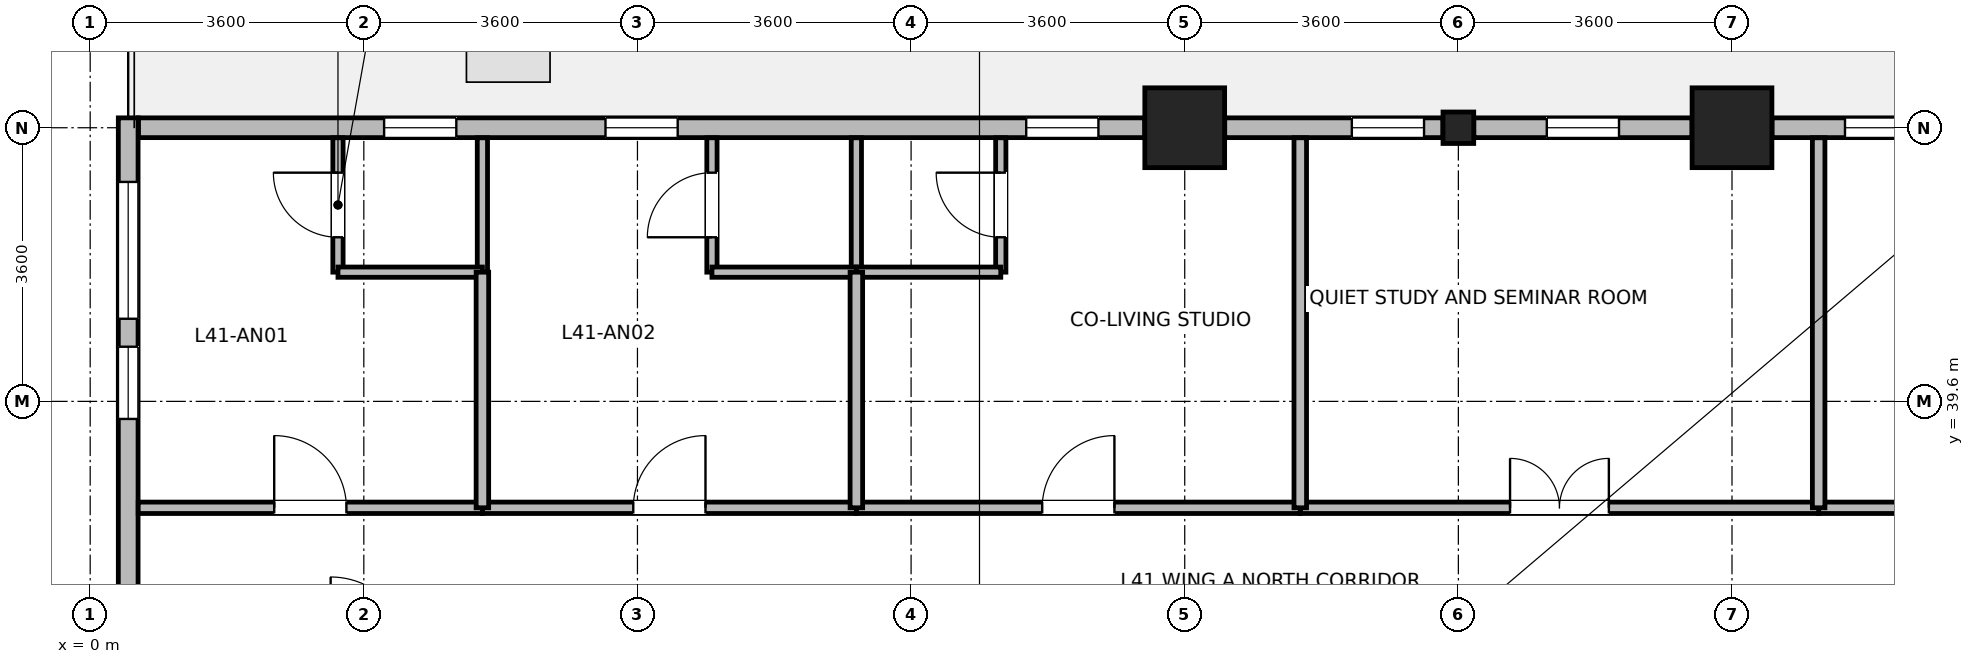
"""IFC4 building model, lengths in metres.
Left out: names, types, materials, properties, quantities, classifications, styles, units other than length and angle.
Written with IfcOpenShell. Run it as: python <this file> out.ifc"""

import sys

from ifc_helpers import new_model, si_unit, direction, frame, frame_2d, origin, origin_2d, place, context, subcontext, project, spatial, rectangle, i_section, extrude, source, transform, mapped, element, fill, save


model = new_model("IFC4")
c1 = context("Model", 3, precision=1e-05, world=origin(), true_north=direction((0.0, 1.0)))
c2 = subcontext(c1, "Body", "Model", "MODEL_VIEW")
j1 = project(units=[si_unit("LENGTHUNIT", "METRE"), si_unit("PLANEANGLEUNIT", "RADIAN")], contexts=[c1])
p1 = place(None, origin())
s1 = spatial("IfcSite", under=j1, at=p1, CompositionType="ELEMENT")
p2 = place(p1, origin())
s2 = spatial("IfcBuilding", under=s1, at=p2, CompositionType="ELEMENT")
p3 = place(p2, frame((0.0, 0.0, 162.4)))
s3 = spatial("IfcBuildingStorey", under=s2, at=p3, CompositionType="ELEMENT", Elevation=162.4)
m1 = source(origin(), c2, "Body", "SweptSolid", [
    extrude(rectangle(XDim=1.05, YDim=1.05, at=origin_2d()), origin(), (0.0, 0.0, 1.0), 3.7),
])
for number, where, z_axis, x_axis in (
    (1, (14.4, 43.2, 0.0), (0.0, 0.0, 1.0), (1.0, 0.0, 0.0)),
    (2, (21.6, 43.2, 0.0), (0.0, 0.0, 1.0), (1.0, 0.0, 0.0)),
):
    element("IfcColumn", number, at=place(p3, frame(where, z_axis=z_axis, x_axis=x_axis)), inside=s3, PredefinedType="COLUMN", context=c2, shape_type="MappedRepresentation", body=[
        mapped(m1, transform((0.0, 0.0, 0.0), x_axis=(1.0, 0.0, 0.0), y_axis=(0.0, 1.0, 0.0), z_axis=(0.0, 0.0, 1.0), scale=1.0)),
    ])
m2 = source(origin(), c2, "Body", "SweptSolid", [
    extrude(i_section(OverallWidth=0.404, OverallDepth=0.414, WebThickness=0.021, FlangeThickness=0.028, FilletRadius=0.015, at=origin_2d()), origin(), (0.0, 0.0, 1.0), 3.7),
])
p4 = place(p3, frame((18.0, 43.2, 0.0), z_axis=(0.0, 0.0, 1.0), x_axis=(1.0, 0.0, 0.0)))
e3 = element("IfcColumn", 3, at=p4, inside=s3, PredefinedType="COLUMN", context=c2, shape_type="MappedRepresentation", body=[
    mapped(m2, transform((0.0, 0.0, 0.0), x_axis=(1.0, 0.0, 0.0), y_axis=(0.0, 1.0, 0.0), z_axis=(0.0, 0.0, 1.0), scale=1.0)),
])
p5 = place(p3, frame((22.126, 43.2, 0.0), z_axis=(0.0, 0.0, 1.0), x_axis=(1.0, 0.0, 0.0)))
e4 = element("IfcWall", 4, at=p5, inside=s3, PredefinedType="STANDARD", context=c2, shape_type="SweptSolid", body=[
    extrude(rectangle(XDim=2.871, YDim=0.26, at=frame_2d((1.436, 0.0))), origin(), (0.0, 0.0, 1.0), 2.99),
])
p6 = place(p5, frame((0.96, 0.0, 0.85)))
e5 = element("IfcOpeningElement", 5, at=p6, cuts=e4, PredefinedType="OPENING", context=c2, shape_type="SweptSolid", body=[
    extrude(rectangle(XDim=0.95, YDim=1.75, at=frame_2d((0.475, 0.875))), frame((0.0, 0.14, 0.0), z_axis=(0.0, -1.0, 0.0), x_axis=(1.0, 0.0, 0.0)), (0.0, 0.0, 1.0), 0.28),
])
p7 = place(p3, frame((18.203, 43.2, 0.0), z_axis=(0.0, 0.0, 1.0), x_axis=(1.0, 0.0, 0.0)))
e6 = element("IfcWall", 6, at=p7, inside=s3, PredefinedType="STANDARD", context=c2, shape_type="SweptSolid", body=[
    extrude(rectangle(XDim=2.871, YDim=0.26, at=frame_2d((1.436, 0.0))), origin(), (0.0, 0.0, 1.0), 2.99),
])
p8 = place(p7, frame((0.96, 0.0, 0.85)))
e7 = element("IfcOpeningElement", 7, at=p8, cuts=e6, PredefinedType="OPENING", context=c2, shape_type="SweptSolid", body=[
    extrude(rectangle(XDim=0.95, YDim=1.75, at=frame_2d((0.475, 0.875))), frame((0.0, 0.14, 0.0), z_axis=(0.0, -1.0, 0.0), x_axis=(1.0, 0.0, 0.0)), (0.0, 0.0, 1.0), 0.28),
])
p9 = place(p3, frame((14.926, 43.2, 0.0), z_axis=(0.0, 0.0, 1.0), x_axis=(1.0, 0.0, 0.0)))
e8 = element("IfcWall", 8, at=p9, inside=s3, PredefinedType="STANDARD", context=c2, shape_type="SweptSolid", body=[
    extrude(rectangle(XDim=2.871, YDim=0.26, at=frame_2d((1.436, 0.0))), origin(), (0.0, 0.0, 1.0), 2.99),
])
p10 = place(p9, frame((1.673, 0.0, 0.85)))
e9 = element("IfcOpeningElement", 9, at=p10, cuts=e8, PredefinedType="OPENING", context=c2, shape_type="SweptSolid", body=[
    extrude(rectangle(XDim=0.95, YDim=1.75, at=frame_2d((0.475, 0.875))), frame((0.0, 0.14, 0.0), z_axis=(0.0, -1.0, 0.0), x_axis=(1.0, 0.0, 0.0)), (0.0, 0.0, 1.0), 0.28),
])
p11 = place(p3, frame((0.635, 43.2, 0.0), z_axis=(0.0, 0.0, 1.0), x_axis=(1.0, 0.0, 0.0)))
e10 = element("IfcWall", 10, at=p11, inside=s3, PredefinedType="STANDARD", context=c2, shape_type="SweptSolid", body=[
    extrude(rectangle(XDim=13.239, YDim=0.26, at=frame_2d((6.62, 0.0))), origin(), (0.0, 0.0, 1.0), 3.44),
])
p12 = place(p11, frame((6.145, 0.0, 0.85)))
e11 = element("IfcOpeningElement", 11, at=p12, cuts=e10, PredefinedType="OPENING", context=c2, shape_type="SweptSolid", body=[
    extrude(rectangle(XDim=0.95, YDim=1.75, at=frame_2d((0.475, 0.875))), frame((0.0, 0.14, 0.0), z_axis=(0.0, -1.0, 0.0), x_axis=(1.0, 0.0, 0.0)), (0.0, 0.0, 1.0), 0.28),
])
p13 = place(p11, frame((3.232, 0.0, 0.85)))
e12 = element("IfcOpeningElement", 12, at=p13, cuts=e10, PredefinedType="OPENING", context=c2, shape_type="SweptSolid", body=[
    extrude(rectangle(XDim=0.95, YDim=1.75, at=frame_2d((0.475, 0.875))), frame((0.0, 0.14, 0.0), z_axis=(0.0, -1.0, 0.0), x_axis=(1.0, 0.0, 0.0)), (0.0, 0.0, 1.0), 0.28),
])
p14 = place(p11, frame((11.679, 0.0, 0.85)))
e13 = element("IfcOpeningElement", 13, at=p14, cuts=e10, PredefinedType="OPENING", context=c2, shape_type="SweptSolid", body=[
    extrude(rectangle(XDim=0.95, YDim=1.75, at=frame_2d((0.475, 0.875))), frame((0.0, 0.14, 0.0), z_axis=(0.0, -1.0, 0.0), x_axis=(1.0, 0.0, 0.0)), (0.0, 0.0, 1.0), 0.28),
])
p15 = place(p3, frame((0.5, 36.358, 0.0), z_axis=(0.0, 0.0, 1.0), x_axis=(0.0, 1.0, 0.0)))
e14 = element("IfcWall", 14, at=p15, inside=s3, PredefinedType="STANDARD", context=c2, shape_type="SweptSolid", body=[
    extrude(rectangle(XDim=6.972, YDim=0.26, at=frame_2d((3.486, 0.0))), origin(), (0.0, 0.0, 1.0), 3.44),
])
p16 = place(p15, frame((4.329, 0.0, 0.85)))
e15 = element("IfcOpeningElement", 15, at=p16, cuts=e14, PredefinedType="OPENING", context=c2, shape_type="SweptSolid", body=[
    extrude(rectangle(XDim=1.8, YDim=1.85, at=frame_2d((0.9, 0.925))), frame((0.0, 0.14, 0.0), z_axis=(0.0, -1.0, 0.0), x_axis=(1.0, 0.0, 0.0)), (0.0, 0.0, 1.0), 0.28),
])
p17 = place(p15, frame((3.011, 0.0, 0.85)))
e16 = element("IfcOpeningElement", 16, at=p17, cuts=e14, PredefinedType="OPENING", context=c2, shape_type="SweptSolid", body=[
    extrude(rectangle(XDim=0.95, YDim=1.75, at=frame_2d((0.475, 0.875))), frame((0.0, 0.14, 0.0), z_axis=(0.0, -1.0, 0.0), x_axis=(1.0, 0.0, 0.0)), (0.0, 0.0, 1.0), 0.28),
])
p18 = place(p3, frame((3.26, 41.3, 0.0), z_axis=(0.0, 0.0, 1.0), x_axis=(0.0, 1.0, 0.0)))
e17 = element("IfcWall", 17, at=p18, inside=s3, PredefinedType="PARTITIONING", context=c2, shape_type="SweptSolid", body=[
    extrude(rectangle(XDim=1.768, YDim=0.135, at=frame_2d((0.884, 0.0))), origin(), (0.0, 0.0, 1.0), 3.44),
])
p19 = place(p18, frame((0.459, 0.0, 0.0)))
e18 = element("IfcOpeningElement", 18, at=p19, cuts=e17, PredefinedType="OPENING", context=c2, shape_type="SweptSolid", body=[
    extrude(rectangle(XDim=0.85, YDim=2.04, at=frame_2d((0.425, 1.02))), frame((0.0, 0.078, 0.0), z_axis=(0.0, -1.0, 0.0), x_axis=(1.0, 0.0, 0.0)), (0.0, 0.0, 1.0), 0.155),
])
p20 = place(p3, frame((5.16, 41.3, 0.0), z_axis=(0.0, 0.0, 1.0), x_axis=(0.0, 1.0, 0.0)))
e19 = element("IfcWall", 19, at=p20, inside=s3, PredefinedType="PARTITIONING", context=c2, shape_type="SweptSolid", body=[
    extrude(rectangle(XDim=1.768, YDim=0.135, at=frame_2d((0.884, 0.0))), origin(), (0.0, 0.0, 1.0), 3.44),
])
p21 = place(p3, frame((8.18, 41.3, 0.0), z_axis=(0.0, 0.0, 1.0), x_axis=(0.0, 1.0, 0.0)))
e20 = element("IfcWall", 20, at=p21, inside=s3, PredefinedType="PARTITIONING", context=c2, shape_type="SweptSolid", body=[
    extrude(rectangle(XDim=1.768, YDim=0.135, at=frame_2d((0.884, 0.0))), origin(), (0.0, 0.0, 1.0), 3.44),
])
p22 = place(p21, frame((0.459, 0.0, 0.0)))
e21 = element("IfcOpeningElement", 21, at=p22, cuts=e20, PredefinedType="OPENING", context=c2, shape_type="SweptSolid", body=[
    extrude(rectangle(XDim=0.85, YDim=2.04, at=frame_2d((0.425, 1.02))), frame((0.0, 0.078, 0.0), z_axis=(0.0, -1.0, 0.0), x_axis=(1.0, 0.0, 0.0)), (0.0, 0.0, 1.0), 0.155),
])
p23 = place(p3, frame((10.08, 41.3, 0.0), z_axis=(0.0, 0.0, 1.0), x_axis=(0.0, 1.0, 0.0)))
e22 = element("IfcWall", 22, at=p23, inside=s3, PredefinedType="PARTITIONING", context=c2, shape_type="SweptSolid", body=[
    extrude(rectangle(XDim=1.768, YDim=0.135, at=frame_2d((0.884, 0.0))), origin(), (0.0, 0.0, 1.0), 3.44),
])
p24 = place(p3, frame((11.98, 41.3, 0.0), z_axis=(0.0, 0.0, 1.0), x_axis=(0.0, 1.0, 0.0)))
e23 = element("IfcWall", 23, at=p24, inside=s3, PredefinedType="PARTITIONING", context=c2, shape_type="SweptSolid", body=[
    extrude(rectangle(XDim=1.768, YDim=0.135, at=frame_2d((0.884, 0.0))), origin(), (0.0, 0.0, 1.0), 3.44),
])
p25 = place(p24, frame((0.459, 0.0, 0.0)))
e24 = element("IfcOpeningElement", 24, at=p25, cuts=e23, PredefinedType="OPENING", context=c2, shape_type="SweptSolid", body=[
    extrude(rectangle(XDim=0.85, YDim=2.04, at=frame_2d((0.425, 1.02))), frame((0.0, 0.078, 0.0), z_axis=(0.0, -1.0, 0.0), x_axis=(1.0, 0.0, 0.0)), (0.0, 0.0, 1.0), 0.155),
])
p26 = place(p3, frame((3.26, 41.3, 0.0), z_axis=(0.0, 0.0, 1.0), x_axis=(1.0, 0.0, 0.0)))
e25 = element("IfcWall", 25, at=p26, inside=s3, PredefinedType="PARTITIONING", context=c2, shape_type="SweptSolid", body=[
    extrude(rectangle(XDim=1.9, YDim=0.135, at=frame_2d((0.95, 0.0))), origin(), (0.0, 0.0, 1.0), 3.44),
])
p27 = place(p3, frame((8.18, 41.3, 0.0), z_axis=(0.0, 0.0, 1.0), x_axis=(1.0, 0.0, 0.0)))
e26 = element("IfcWall", 26, at=p27, inside=s3, PredefinedType="PARTITIONING", context=c2, shape_type="SweptSolid", body=[
    extrude(rectangle(XDim=1.9, YDim=0.135, at=frame_2d((0.95, 0.0))), origin(), (0.0, 0.0, 1.0), 3.44),
])
p28 = place(p3, frame((10.08, 41.3, 0.0), z_axis=(0.0, 0.0, 1.0), x_axis=(1.0, 0.0, 0.0)))
e27 = element("IfcWall", 27, at=p28, inside=s3, PredefinedType="PARTITIONING", context=c2, shape_type="SweptSolid", body=[
    extrude(rectangle(XDim=1.9, YDim=0.135, at=frame_2d((0.95, 0.0))), origin(), (0.0, 0.0, 1.0), 3.44),
])
p29 = place(p3, frame((22.74, 38.2, 0.0), z_axis=(0.0, 0.0, 1.0), x_axis=(1.0, 0.0, 0.0)))
e28 = element("IfcWall", 28, at=p29, inside=s3, PredefinedType="PARTITIONING", context=c2, shape_type="SweptSolid", body=[
    extrude(rectangle(XDim=7.82, YDim=0.15, at=frame_2d((3.91, 0.0))), origin(), (0.0, 0.0, 1.0), 3.44),
])
p30 = place(p29, frame((3.46, 0.0, 0.0)))
e29 = element("IfcOpeningElement", 29, at=p30, cuts=e28, PredefinedType="OPENING", context=c2, shape_type="SweptSolid", body=[
    extrude(rectangle(XDim=0.9, YDim=2.08, at=frame_2d((0.45, 1.04))), frame((0.0, 0.085, 0.0), z_axis=(0.0, -1.0, 0.0), x_axis=(1.0, 0.0, 0.0)), (0.0, 0.0, 1.0), 0.17),
])
p31 = place(p3, frame((15.92, 38.2, 0.0), z_axis=(0.0, 0.0, 1.0), x_axis=(1.0, 0.0, 0.0)))
e30 = element("IfcWall", 30, at=p31, inside=s3, PredefinedType="PARTITIONING", context=c2, shape_type="SweptSolid", body=[
    extrude(rectangle(XDim=6.82, YDim=0.15, at=frame_2d((3.41, 0.0))), origin(), (0.0, 0.0, 1.0), 3.44),
])
p32 = place(p31, frame((2.76, 0.0, 0.0)))
e31 = element("IfcOpeningElement", 31, at=p32, cuts=e30, PredefinedType="OPENING", context=c2, shape_type="SweptSolid", body=[
    extrude(rectangle(XDim=1.3, YDim=2.12, at=frame_2d((0.65, 1.06))), frame((0.0, 0.085, 0.0), z_axis=(0.0, -1.0, 0.0), x_axis=(1.0, 0.0, 0.0)), (0.0, 0.0, 1.0), 0.17),
])
p33 = place(p3, frame((10.08, 38.2, 0.0), z_axis=(0.0, 0.0, 1.0), x_axis=(1.0, 0.0, 0.0)))
e32 = element("IfcWall", 32, at=p33, inside=s3, PredefinedType="PARTITIONING", context=c2, shape_type="SweptSolid", body=[
    extrude(rectangle(XDim=5.84, YDim=0.15, at=frame_2d((2.92, 0.0))), origin(), (0.0, 0.0, 1.0), 3.44),
])
p34 = place(p33, frame((2.445, 0.0, 0.0)))
e33 = element("IfcOpeningElement", 33, at=p34, cuts=e32, PredefinedType="OPENING", context=c2, shape_type="SweptSolid", body=[
    extrude(rectangle(XDim=0.95, YDim=2.1, at=frame_2d((0.475, 1.05))), frame((0.0, 0.085, 0.0), z_axis=(0.0, -1.0, 0.0), x_axis=(1.0, 0.0, 0.0)), (0.0, 0.0, 1.0), 0.17),
])
p35 = place(p3, frame((5.16, 38.2, 0.0), z_axis=(0.0, 0.0, 1.0), x_axis=(1.0, 0.0, 0.0)))
e34 = element("IfcWall", 34, at=p35, inside=s3, PredefinedType="PARTITIONING", context=c2, shape_type="SweptSolid", body=[
    extrude(rectangle(XDim=4.92, YDim=0.15, at=frame_2d((2.46, 0.0))), origin(), (0.0, 0.0, 1.0), 3.44),
])
p36 = place(p35, frame((1.985, 0.0, 0.0)))
e35 = element("IfcOpeningElement", 35, at=p36, cuts=e34, PredefinedType="OPENING", context=c2, shape_type="SweptSolid", body=[
    extrude(rectangle(XDim=0.95, YDim=2.1, at=frame_2d((0.475, 1.05))), frame((0.0, 0.085, 0.0), z_axis=(0.0, -1.0, 0.0), x_axis=(1.0, 0.0, 0.0)), (0.0, 0.0, 1.0), 0.17),
])
p37 = place(p3, frame((0.632, 38.2, 0.0), z_axis=(0.0, 0.0, 1.0), x_axis=(1.0, 0.0, 0.0)))
e36 = element("IfcWall", 36, at=p37, inside=s3, PredefinedType="PARTITIONING", context=c2, shape_type="SweptSolid", body=[
    extrude(rectangle(XDim=4.528, YDim=0.15, at=frame_2d((2.264, 0.0))), origin(), (0.0, 0.0, 1.0), 3.44),
])
p38 = place(p37, frame((1.789, 0.0, 0.0)))
e37 = element("IfcOpeningElement", 37, at=p38, cuts=e36, PredefinedType="OPENING", context=c2, shape_type="SweptSolid", body=[
    extrude(rectangle(XDim=0.95, YDim=2.1, at=frame_2d((0.475, 1.05))), frame((0.0, 0.085, 0.0), z_axis=(0.0, -1.0, 0.0), x_axis=(1.0, 0.0, 0.0)), (0.0, 0.0, 1.0), 0.17),
])
for number, where, z_axis, x_axis in (
    (38, (15.92, 38.2, 0.0), (0.0, 0.0, 1.0), (0.0, 1.0, 0.0)),
    (39, (22.74, 38.2, 0.0), (0.0, 0.0, 1.0), (0.0, 1.0, 0.0)),
):
    element("IfcWall", number, at=place(p3, frame(where, z_axis=z_axis, x_axis=x_axis)), inside=s3, PredefinedType="PARTITIONING", context=c2, shape_type="SweptSolid", body=[
        extrude(rectangle(XDim=4.868, YDim=0.165, at=frame_2d((2.434, 0.0))), origin(), (0.0, 0.0, 1.0), 3.44),
    ])
for number, where, z_axis, x_axis in (
    (40, (5.16, 38.2, 0.0), (0.0, 0.0, 1.0), (0.0, 1.0, 0.0)),
    (41, (10.08, 38.2, 0.0), (0.0, 0.0, 1.0), (0.0, 1.0, 0.0)),
):
    element("IfcWall", number, at=place(p3, frame(where, z_axis=z_axis, x_axis=x_axis)), inside=s3, PredefinedType="PARTITIONING", context=c2, shape_type="SweptSolid", body=[
        extrude(rectangle(XDim=3.1, YDim=0.165, at=frame_2d((1.55, 0.0))), origin(), (0.0, 0.0, 1.0), 3.44),
    ])
p39 = place(p6, origin())
e42 = element("IfcWindow", 42, at=p39, inside=s3, PartitioningType="SINGLE_PANEL", PredefinedType="WINDOW", context=c2, shape_type="SweptSolid", body=[
    extrude(rectangle(XDim=0.95, YDim=1.75, at=frame_2d((0.475, 0.875))), frame((0.0, 0.03, 0.0), z_axis=(0.0, -1.0, 0.0), x_axis=(1.0, 0.0, 0.0)), (0.0, 0.0, 1.0), 0.06),
])
fill(e5, e42)
p40 = place(p8, origin())
e43 = element("IfcWindow", 43, at=p40, inside=s3, PartitioningType="SINGLE_PANEL", PredefinedType="WINDOW", context=c2, shape_type="SweptSolid", body=[
    extrude(rectangle(XDim=0.95, YDim=1.75, at=frame_2d((0.475, 0.875))), frame((0.0, 0.03, 0.0), z_axis=(0.0, -1.0, 0.0), x_axis=(1.0, 0.0, 0.0)), (0.0, 0.0, 1.0), 0.06),
])
fill(e7, e43)
p41 = place(p10, origin())
e44 = element("IfcWindow", 44, at=p41, inside=s3, PartitioningType="SINGLE_PANEL", PredefinedType="WINDOW", context=c2, shape_type="SweptSolid", body=[
    extrude(rectangle(XDim=0.95, YDim=1.75, at=frame_2d((0.475, 0.875))), frame((0.0, 0.03, 0.0), z_axis=(0.0, -1.0, 0.0), x_axis=(1.0, 0.0, 0.0)), (0.0, 0.0, 1.0), 0.06),
])
fill(e9, e44)
p42 = place(p12, origin())
e45 = element("IfcWindow", 45, at=p42, inside=s3, PartitioningType="SINGLE_PANEL", PredefinedType="WINDOW", context=c2, shape_type="SweptSolid", body=[
    extrude(rectangle(XDim=0.95, YDim=1.75, at=frame_2d((0.475, 0.875))), frame((0.0, 0.03, 0.0), z_axis=(0.0, -1.0, 0.0), x_axis=(1.0, 0.0, 0.0)), (0.0, 0.0, 1.0), 0.06),
])
fill(e11, e45)
p43 = place(p13, origin())
e46 = element("IfcWindow", 46, at=p43, inside=s3, PartitioningType="SINGLE_PANEL", PredefinedType="WINDOW", context=c2, shape_type="SweptSolid", body=[
    extrude(rectangle(XDim=0.95, YDim=1.75, at=frame_2d((0.475, 0.875))), frame((0.0, 0.03, 0.0), z_axis=(0.0, -1.0, 0.0), x_axis=(1.0, 0.0, 0.0)), (0.0, 0.0, 1.0), 0.06),
])
fill(e12, e46)
p44 = place(p14, origin())
e47 = element("IfcWindow", 47, at=p44, inside=s3, PartitioningType="SINGLE_PANEL", PredefinedType="WINDOW", context=c2, shape_type="SweptSolid", body=[
    extrude(rectangle(XDim=0.95, YDim=1.75, at=frame_2d((0.475, 0.875))), frame((0.0, 0.03, 0.0), z_axis=(0.0, -1.0, 0.0), x_axis=(1.0, 0.0, 0.0)), (0.0, 0.0, 1.0), 0.06),
])
fill(e13, e47)
p45 = place(p16, origin())
e48 = element("IfcWindow", 48, at=p45, inside=s3, PartitioningType="SINGLE_PANEL", PredefinedType="WINDOW", context=c2, shape_type="SweptSolid", body=[
    extrude(rectangle(XDim=1.8, YDim=1.85, at=frame_2d((0.9, 0.925))), frame((0.0, 0.03, 0.0), z_axis=(0.0, -1.0, 0.0), x_axis=(1.0, 0.0, 0.0)), (0.0, 0.0, 1.0), 0.06),
])
fill(e15, e48)
p46 = place(p17, origin())
e49 = element("IfcWindow", 49, at=p46, inside=s3, PartitioningType="SINGLE_PANEL", PredefinedType="WINDOW", context=c2, shape_type="SweptSolid", body=[
    extrude(rectangle(XDim=0.95, YDim=1.75, at=frame_2d((0.475, 0.875))), frame((0.0, 0.03, 0.0), z_axis=(0.0, -1.0, 0.0), x_axis=(1.0, 0.0, 0.0)), (0.0, 0.0, 1.0), 0.06),
])
fill(e16, e49)
p47 = place(p19, origin())
e50 = element("IfcDoor", 50, at=p47, inside=s3, OperationType="SINGLE_SWING_RIGHT", PredefinedType="DOOR", context=c2, shape_type="SweptSolid", body=[
    extrude(rectangle(XDim=0.85, YDim=2.04, at=frame_2d((0.425, 1.02))), frame((0.0, 0.025, 0.0), z_axis=(0.0, -1.0, 0.0), x_axis=(1.0, 0.0, 0.0)), (0.0, 0.0, 1.0), 0.05),
])
fill(e18, e50)
p48 = place(p22, origin())
e51 = element("IfcDoor", 51, at=p48, inside=s3, OperationType="SINGLE_SWING_LEFT", PredefinedType="DOOR", context=c2, shape_type="SweptSolid", body=[
    extrude(rectangle(XDim=0.85, YDim=2.04, at=frame_2d((0.425, 1.02))), frame((0.0, 0.025, 0.0), z_axis=(0.0, -1.0, 0.0), x_axis=(1.0, 0.0, 0.0)), (0.0, 0.0, 1.0), 0.05),
])
fill(e21, e51)
p49 = place(p25, origin())
e52 = element("IfcDoor", 52, at=p49, inside=s3, OperationType="SINGLE_SWING_RIGHT", PredefinedType="DOOR", context=c2, shape_type="SweptSolid", body=[
    extrude(rectangle(XDim=0.85, YDim=2.04, at=frame_2d((0.425, 1.02))), frame((0.0, 0.025, 0.0), z_axis=(0.0, -1.0, 0.0), x_axis=(1.0, 0.0, 0.0)), (0.0, 0.0, 1.0), 0.05),
])
fill(e24, e52)
p50 = place(p32, origin())
e53 = element("IfcDoor", 53, at=p50, inside=s3, OperationType="DOUBLE_DOOR_SINGLE_SWING", PredefinedType="DOOR", context=c2, shape_type="SweptSolid", body=[
    extrude(rectangle(XDim=1.3, YDim=2.12, at=frame_2d((0.65, 1.06))), frame((0.0, 0.025, 0.0), z_axis=(0.0, -1.0, 0.0), x_axis=(1.0, 0.0, 0.0)), (0.0, 0.0, 1.0), 0.05),
])
fill(e31, e53)
p51 = place(p34, origin())
e54 = element("IfcDoor", 54, at=p51, inside=s3, OperationType="SINGLE_SWING_RIGHT", PredefinedType="DOOR", context=c2, shape_type="SweptSolid", body=[
    extrude(rectangle(XDim=0.95, YDim=2.1, at=frame_2d((0.475, 1.05))), frame((0.0, 0.025, 0.0), z_axis=(0.0, -1.0, 0.0), x_axis=(1.0, 0.0, 0.0)), (0.0, 0.0, 1.0), 0.05),
])
fill(e33, e54)
p52 = place(p36, origin())
e55 = element("IfcDoor", 55, at=p52, inside=s3, OperationType="SINGLE_SWING_RIGHT", PredefinedType="DOOR", context=c2, shape_type="SweptSolid", body=[
    extrude(rectangle(XDim=0.95, YDim=2.1, at=frame_2d((0.475, 1.05))), frame((0.0, 0.025, 0.0), z_axis=(0.0, -1.0, 0.0), x_axis=(1.0, 0.0, 0.0)), (0.0, 0.0, 1.0), 0.05),
])
fill(e35, e55)
p53 = place(p38, origin())
e56 = element("IfcDoor", 56, at=p53, inside=s3, OperationType="SINGLE_SWING_LEFT", PredefinedType="DOOR", context=c2, shape_type="SweptSolid", body=[
    extrude(rectangle(XDim=0.95, YDim=2.1, at=frame_2d((0.475, 1.05))), frame((0.0, 0.025, 0.0), z_axis=(0.0, -1.0, 0.0), x_axis=(1.0, 0.0, 0.0)), (0.0, 0.0, 1.0), 0.05),
])
fill(e37, e56)
save(model, sys.argv[1])
